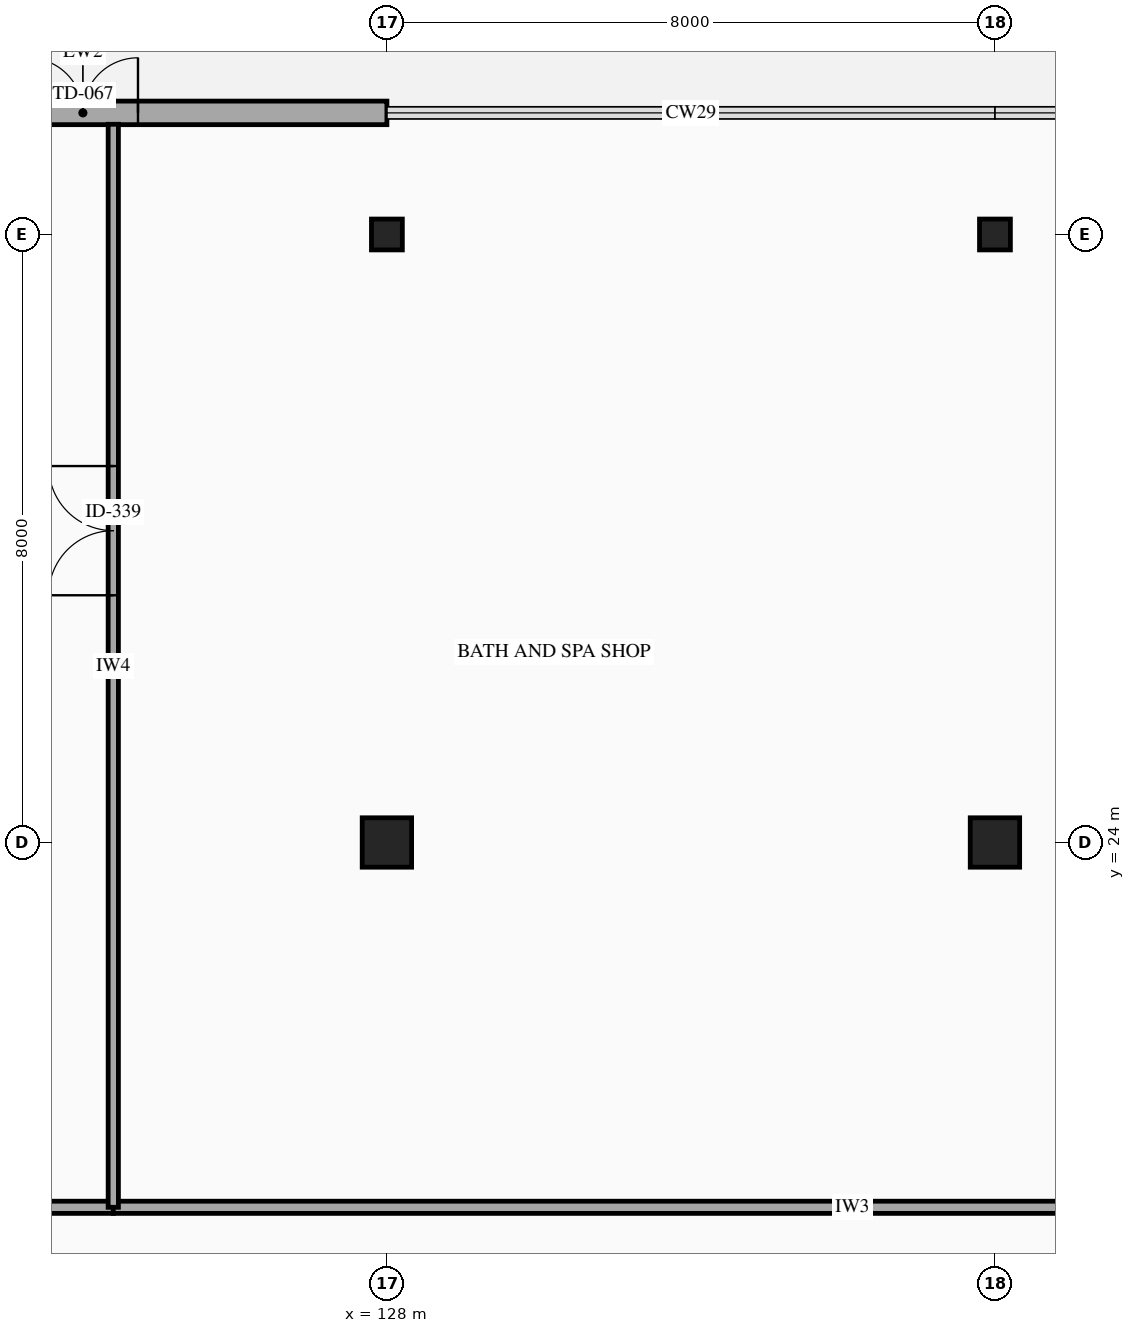
"""IFC4 building model, lengths in metres.
Left out: names, types, materials, properties, quantities, classifications, styles, units other than length and angle.
Written with IfcOpenShell. Run it as: python <this file> out.ifc"""

import sys

from ifc_helpers import new_model, si_unit, direction, frame, frame_2d, origin, origin_2d, place, context, subcontext, project, spatial, rectangle, hollow_circle, extrude, element, fill, save


model = new_model("IFC4")
c1 = context("Model", 3, precision=1e-05, world=origin(), true_north=direction((0.0, 1.0)))
c2 = subcontext(c1, "Body", "Model", "MODEL_VIEW")
j1 = project(units=[si_unit("LENGTHUNIT", "METRE"), si_unit("PLANEANGLEUNIT", "RADIAN")], contexts=[c1])
p1 = place(None, origin())
s1 = spatial("IfcSite", under=j1, at=p1, CompositionType="ELEMENT")
p2 = place(p1, origin())
s2 = spatial("IfcBuilding", under=s1, at=p2, CompositionType="ELEMENT")
p3 = place(p2, frame((0.0, 0.0, 14.9)))
s3 = spatial("IfcBuildingStorey", under=s2, at=p3, CompositionType="ELEMENT", Elevation=14.9)
p4 = place(p3, frame((128.0, 24.0, 0.0), z_axis=(0.0, 0.0, 1.0), x_axis=(1.0, 0.0, 0.0)))
e1 = element("IfcColumn", 1, at=p4, inside=s3, PredefinedType="COLUMN", context=c2, shape_type="SweptSolid", body=[
    extrude(rectangle(XDim=0.65, YDim=0.65, at=origin_2d()), origin(), (0.0, 0.0, 1.0), 4.5),
])
p5 = place(p3, frame((128.0, 32.0, 0.0), z_axis=(0.0, 0.0, 1.0), x_axis=(1.0, 0.0, 0.0)))
e2 = element("IfcColumn", 2, at=p5, inside=s3, PredefinedType="COLUMN", context=c2, shape_type="SweptSolid", body=[
    extrude(hollow_circle(Radius=0.203, WallThickness=0.012, at=origin_2d()), origin(), (0.0, 0.0, 1.0), 4.5),
])
p6 = place(p3, frame((136.0, 24.0, 0.0), z_axis=(0.0, 0.0, 1.0), x_axis=(1.0, 0.0, 0.0)))
e3 = element("IfcColumn", 3, at=p6, inside=s3, PredefinedType="COLUMN", context=c2, shape_type="SweptSolid", body=[
    extrude(rectangle(XDim=0.65, YDim=0.65, at=origin_2d()), origin(), (0.0, 0.0, 1.0), 4.5),
])
p7 = place(p3, frame((136.0, 32.0, 0.0), z_axis=(0.0, 0.0, 1.0), x_axis=(1.0, 0.0, 0.0)))
e4 = element("IfcColumn", 4, at=p7, inside=s3, PredefinedType="COLUMN", context=c2, shape_type="SweptSolid", body=[
    extrude(hollow_circle(Radius=0.203, WallThickness=0.012, at=origin_2d()), origin(), (0.0, 0.0, 1.0), 4.5),
])
p8 = place(p3, frame((120.0, 33.6, 0.0), z_axis=(0.0, 0.0, 1.0), x_axis=(1.0, 0.0, 0.0)))
e5 = element("IfcWall", 5, at=p8, inside=s3, PredefinedType="STANDARD", context=c2, shape_type="SweptSolid", body=[
    extrude(rectangle(XDim=8.0, YDim=0.31, at=frame_2d((4.0, 0.0))), origin(), (0.0, 0.0, 1.0), 3.48),
])
p9 = place(p8, frame((3.275, 0.0, 0.0)))
e6 = element("IfcOpeningElement", 6, at=p9, cuts=e5, PredefinedType="OPENING", context=c2, shape_type="SweptSolid", body=[
    extrude(rectangle(XDim=1.45, YDim=2.1, at=frame_2d((0.725, 1.05))), frame((0.0, 0.165, 0.0), z_axis=(0.0, -1.0, 0.0), x_axis=(1.0, 0.0, 0.0)), (0.0, 0.0, 1.0), 0.33),
])
p10 = place(p3, frame((104.4, 19.2, 0.0), z_axis=(0.0, 0.0, 1.0), x_axis=(1.0, 0.0, 0.0)))
e7 = element("IfcWall", 7, at=p10, inside=s3, PredefinedType="PARTITIONING", context=c2, shape_type="SweptSolid", body=[
    extrude(rectangle(XDim=20.0, YDim=0.16, at=frame_2d((10.0, 0.0))), origin(), (0.0, 0.0, 1.0), 3.48),
])
p11 = place(p10, frame((2.82, 0.0, 0.0)))
e8 = element("IfcOpeningElement", 8, at=p11, cuts=e7, PredefinedType="OPENING", context=c2, shape_type="SweptSolid", body=[
    extrude(rectangle(XDim=1.7, YDim=2.25, at=frame_2d((0.85, 1.125))), frame((0.0, 0.09, 0.0), z_axis=(0.0, -1.0, 0.0), x_axis=(1.0, 0.0, 0.0)), (0.0, 0.0, 1.0), 0.18),
])
p12 = place(p3, frame((124.4, 19.2, 0.0), z_axis=(0.0, 0.0, 1.0), x_axis=(1.0, 0.0, 0.0)))
e9 = element("IfcWall", 9, at=p12, inside=s3, PredefinedType="PARTITIONING", context=c2, shape_type="SweptSolid", body=[
    extrude(rectangle(XDim=19.45, YDim=0.16, at=frame_2d((9.725, 0.0))), origin(), (0.0, 0.0, 1.0), 3.48),
])
p13 = place(p12, frame((14.92, 0.0, 0.0)))
e10 = element("IfcOpeningElement", 10, at=p13, cuts=e9, PredefinedType="OPENING", context=c2, shape_type="SweptSolid", body=[
    extrude(rectangle(XDim=1.7, YDim=2.25, at=frame_2d((0.85, 1.125))), frame((0.0, 0.09, 0.0), z_axis=(0.0, -1.0, 0.0), x_axis=(1.0, 0.0, 0.0)), (0.0, 0.0, 1.0), 0.18),
])
p14 = place(p3, frame((124.4, 19.2, 0.0), z_axis=(0.0, 0.0, 1.0), x_axis=(0.0, 1.0, 0.0)))
e11 = element("IfcWall", 11, at=p14, inside=s3, PredefinedType="PARTITIONING", context=c2, shape_type="SweptSolid", body=[
    extrude(rectangle(XDim=14.25, YDim=0.135, at=frame_2d((7.125, 0.0))), origin(), (0.0, 0.0, 1.0), 3.48),
])
p15 = place(p14, frame((8.053, 0.0, 0.0)))
e12 = element("IfcOpeningElement", 12, at=p15, cuts=e11, PredefinedType="OPENING", context=c2, shape_type="SweptSolid", body=[
    extrude(rectangle(XDim=1.7, YDim=2.25, at=frame_2d((0.85, 1.125))), frame((0.0, 0.077, 0.0), z_axis=(0.0, -1.0, 0.0), x_axis=(1.0, 0.0, 0.0)), (0.0, 0.0, 1.0), 0.155),
])
p16 = place(p9, origin())
e13 = element("IfcDoor", 13, at=p16, inside=s3, OperationType="DOUBLE_DOOR_SINGLE_SWING", PredefinedType="DOOR", context=c2, shape_type="SweptSolid", body=[
    extrude(rectangle(XDim=1.45, YDim=2.1, at=frame_2d((0.725, 1.05))), frame((0.0, 0.025, 0.0), z_axis=(0.0, -1.0, 0.0), x_axis=(1.0, 0.0, 0.0)), (0.0, 0.0, 1.0), 0.05),
])
fill(e6, e13)
p17 = place(p15, origin())
e14 = element("IfcDoor", 14, at=p17, inside=s3, OperationType="DOUBLE_DOOR_SINGLE_SWING", PredefinedType="DOOR", context=c2, shape_type="SweptSolid", body=[
    extrude(rectangle(XDim=1.7, YDim=2.25, at=frame_2d((0.85, 1.125))), frame((0.0, 0.025, 0.0), z_axis=(0.0, -1.0, 0.0), x_axis=(1.0, 0.0, 0.0)), (0.0, 0.0, 1.0), 0.05),
])
fill(e12, e14)
save(model, sys.argv[1])
